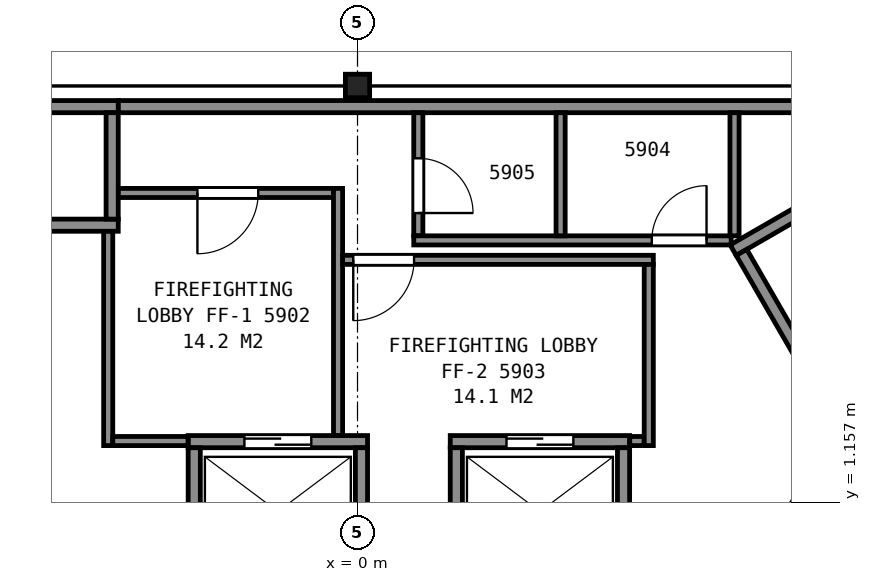
"""IFC4 building model, lengths in metres.
Left out: names, types, materials, properties, quantities, classifications, styles, units other than length and angle.
Written with IfcOpenShell. Run it as: python <this file> out.ifc"""

import sys

from ifc_helpers import new_model, si_unit, direction, frame, frame_2d, origin, origin_2d, place, context, subcontext, project, spatial, rectangle, i_section, extrude, element, fill, save


model = new_model("IFC4")
c1 = context("Model", 3, precision=1e-05, world=origin(), true_north=direction((0.0, 1.0)))
c2 = subcontext(c1, "Body", "Model", "MODEL_VIEW")
j1 = project(units=[si_unit("LENGTHUNIT", "METRE"), si_unit("PLANEANGLEUNIT", "RADIAN")], contexts=[c1])
p1 = place(None, origin())
s1 = spatial("IfcSite", under=j1, at=p1, CompositionType="ELEMENT")
p2 = place(p1, origin())
s2 = spatial("IfcBuilding", under=s1, at=p2, CompositionType="ELEMENT")
p3 = place(p2, frame((0.0, 0.0, 236.0)))
s3 = spatial("IfcBuildingStorey", under=s2, at=p3, CompositionType="ELEMENT", Elevation=236.0)
p4 = place(p3, frame((0.0, 8.0, 0.0), z_axis=(0.0, 0.0, 1.0), x_axis=(1.0, 0.0, 0.0)))
e1 = element("IfcColumn", 1, at=p4, inside=s3, PredefinedType="COLUMN", context=c2, shape_type="SweptSolid", body=[
    extrude(i_section(OverallWidth=0.399, OverallDepth=0.386, WebThickness=0.021, FlangeThickness=0.033, FilletRadius=0.015, at=origin_2d()), origin(), (0.0, 0.0, 1.0), 3.7),
])
p5 = place(p3, frame((6.178, 5.299, 0.0), z_axis=(0.0, 0.0, 1.0), x_axis=(0.866019993635, 0.500009370536, 0.0)))
e2 = element("IfcWall", 2, at=p5, inside=s3, PredefinedType="PARTITIONING", context=c2, shape_type="SweptSolid", body=[
    extrude(rectangle(XDim=9.6, YDim=0.2, at=frame_2d((4.8, 0.0))), origin(), (0.0, 0.0, 1.0), 3.45),
])
p6 = place(p3, frame((7.715, 2.838, 0.0), z_axis=(0.0, 0.0, 1.0), x_axis=(-0.500049511043, 0.865996816683, 0.0)))
e3 = element("IfcWall", 3, at=p6, inside=s3, PredefinedType="PARTITIONING", context=c2, shape_type="SweptSolid", body=[
    extrude(rectangle(XDim=2.8, YDim=0.2, at=frame_2d((1.4, 0.0))), origin(), (0.0, 0.0, 1.0), 3.45),
])
p7 = place(p3, frame((-2.785, 2.15, 0.0), z_axis=(0.0, 0.0, 1.0), x_axis=(1.0, 0.0, 0.0)))
e4 = element("IfcWall", 4, at=p7, inside=s3, PredefinedType="PARTITIONING", context=c2, shape_type="SweptSolid", body=[
    extrude(rectangle(XDim=2.95, YDim=0.2, at=frame_2d((1.475, 0.0))), origin(), (0.0, 0.0, 1.0), 3.7),
])
p8 = place(p7, frame((0.925, 0.0, 0.0)))
e5 = element("IfcOpeningElement", 5, at=p8, cuts=e4, PredefinedType="OPENING", context=c2, shape_type="SweptSolid", body=[
    extrude(rectangle(XDim=1.1, YDim=2.1, at=frame_2d((0.55, 1.05))), frame((0.0, 0.11, 0.0), z_axis=(0.0, -1.0, 0.0), x_axis=(1.0, 0.0, 0.0)), (0.0, 0.0, 1.0), 0.22),
])
p9 = place(p3, frame((1.525, 2.15, 0.0), z_axis=(0.0, 0.0, 1.0), x_axis=(1.0, 0.0, 0.0)))
e6 = element("IfcWall", 6, at=p9, inside=s3, PredefinedType="PARTITIONING", context=c2, shape_type="SweptSolid", body=[
    extrude(rectangle(XDim=2.95, YDim=0.2, at=frame_2d((1.475, 0.0))), origin(), (0.0, 0.0, 1.0), 3.7),
])
p10 = place(p9, frame((0.925, 0.0, 0.0)))
e7 = element("IfcOpeningElement", 7, at=p10, cuts=e6, PredefinedType="OPENING", context=c2, shape_type="SweptSolid", body=[
    extrude(rectangle(XDim=1.1, YDim=2.1, at=frame_2d((0.55, 1.05))), frame((0.0, 0.11, 0.0), z_axis=(0.0, -1.0, 0.0), x_axis=(1.0, 0.0, 0.0)), (0.0, 0.0, 1.0), 0.22),
])
for number, where, z_axis, x_axis in (
    (8, (-6.285, 5.71, 0.0), (0.0, 0.0, 1.0), (1.0, 0.0, 0.0)),
    (9, (-6.285, 7.66, 0.0), (0.0, 0.0, 1.0), (1.0, 0.0, 0.0)),
):
    element("IfcWall", number, at=place(p3, frame(where, z_axis=z_axis, x_axis=x_axis)), inside=s3, PredefinedType="PARTITIONING", context=c2, shape_type="SweptSolid", body=[
        extrude(rectangle(XDim=2.35, YDim=0.2, at=frame_2d((1.175, 0.0))), origin(), (0.0, 0.0, 1.0), 3.7),
    ])
p11 = place(p3, frame((5.663, -1.612, 0.0), z_axis=(0.0, 0.0, 1.0), x_axis=(0.49998122708, 0.866036242063, 0.0)))
e10 = element("IfcWall", 10, at=p11, inside=s3, PredefinedType="PARTITIONING", context=c2, shape_type="SweptSolid", body=[
    extrude(rectangle(XDim=4.9, YDim=0.2, at=frame_2d((2.45, 0.0))), origin(), (0.0, 0.0, 1.0), 3.7),
])
for number, where, z_axis, x_axis in (
    (11, (4.375, 0.1, 0.0), (0.0, 0.0, 1.0), (0.0, 1.0, 0.0)),
    (12, (1.625, 0.1, 0.0), (0.0, 0.0, 1.0), (0.0, 1.0, 0.0)),
    (13, (0.065, 0.1, 0.0), (0.0, 0.0, 1.0), (0.0, 1.0, 0.0)),
    (14, (-2.685, 0.1, 0.0), (0.0, 0.0, 1.0), (0.0, 1.0, 0.0)),
):
    element("IfcWall", number, at=place(p3, frame(where, z_axis=z_axis, x_axis=x_axis)), inside=s3, PredefinedType="PARTITIONING", context=c2, shape_type="SweptSolid", body=[
        extrude(rectangle(XDim=1.95, YDim=0.2, at=frame_2d((0.975, 0.0))), origin(), (0.0, 0.0, 1.0), 3.7),
    ])
p12 = place(p3, frame((-4.035, 5.81, 0.0), z_axis=(0.0, 0.0, 1.0), x_axis=(0.0, 1.0, 0.0)))
e15 = element("IfcWall", 15, at=p12, inside=s3, PredefinedType="PARTITIONING", context=c2, shape_type="SweptSolid", body=[
    extrude(rectangle(XDim=1.75, YDim=0.2, at=frame_2d((0.875, 0.0))), origin(), (0.0, 0.0, 1.0), 3.7),
])
p13 = place(p3, frame((-4.1, 2.085, 0.0), z_axis=(0.0, 0.0, 1.0), x_axis=(0.0, 1.0, 0.0)))
e16 = element("IfcWall", 16, at=p13, inside=s3, PredefinedType="PARTITIONING", context=c2, shape_type="SweptSolid", body=[
    extrude(rectangle(XDim=3.523, YDim=0.15, at=frame_2d((1.761, 0.0))), origin(), (0.0, 0.0, 1.0), 3.45),
])
p14 = place(p3, frame((-4.025, 2.16, 0.0), z_axis=(0.0, 0.0, 1.0), x_axis=(1.0, 0.0, 0.0)))
e17 = element("IfcWall", 17, at=p14, inside=s3, PredefinedType="PARTITIONING", context=c2, shape_type="SweptSolid", body=[
    extrude(rectangle(XDim=1.238, YDim=0.15, at=frame_2d((0.619, 0.0))), origin(), (0.0, 0.0, 1.0), 3.45),
])
p15 = place(p3, frame((-3.933, 6.24, 0.0), z_axis=(0.0, 0.0, 1.0), x_axis=(1.0, 0.0, 0.0)))
e18 = element("IfcWall", 18, at=p15, inside=s3, PredefinedType="PARTITIONING", context=c2, shape_type="SweptSolid", body=[
    extrude(rectangle(XDim=3.538, YDim=0.15, at=frame_2d((1.769, 0.0))), origin(), (0.0, 0.0, 1.0), 3.45),
])
p16 = place(p15, frame((1.3, 0.0, 0.0)))
e19 = element("IfcOpeningElement", 19, at=p16, cuts=e18, PredefinedType="OPENING", context=c2, shape_type="SweptSolid", body=[
    extrude(rectangle(XDim=1.0, YDim=2.1, at=frame_2d((0.5, 1.05))), frame((0.0, 0.085, 0.0), z_axis=(0.0, -1.0, 0.0), x_axis=(1.0, 0.0, 0.0)), (0.0, 0.0, 1.0), 0.17),
])
p17 = place(p3, frame((-3.933, 7.66, 0.0), z_axis=(0.0, 0.0, 1.0), x_axis=(1.0, 0.0, 0.0)))
e20 = element("IfcWall", 20, at=p17, inside=s3, PredefinedType="PARTITIONING", context=c2, shape_type="SweptSolid", body=[
    extrude(rectangle(XDim=13.841, YDim=0.2, at=frame_2d((6.92, 0.0))), origin(), (0.0, 0.0, 1.0), 3.45),
])
p18 = place(p3, frame((-0.32, 2.252, 0.0), z_axis=(0.0, 0.0, 1.0), x_axis=(0.0, 1.0, 0.0)))
e21 = element("IfcWall", 21, at=p18, inside=s3, PredefinedType="PARTITIONING", context=c2, shape_type="SweptSolid", body=[
    extrude(rectangle(XDim=4.063, YDim=0.15, at=frame_2d((2.031, 0.0))), origin(), (0.0, 0.0, 1.0), 3.45),
])
p19 = place(p3, frame((-0.245, 5.14, 0.0), z_axis=(0.0, 0.0, 1.0), x_axis=(1.0, 0.0, 0.0)))
e22 = element("IfcWall", 22, at=p19, inside=s3, PredefinedType="PARTITIONING", context=c2, shape_type="SweptSolid", body=[
    extrude(rectangle(XDim=5.11, YDim=0.15, at=frame_2d((2.555, 0.0))), origin(), (0.0, 0.0, 1.0), 3.45),
])
p20 = place(p19, frame((0.175, 0.0, 0.0)))
e23 = element("IfcOpeningElement", 23, at=p20, cuts=e22, PredefinedType="OPENING", context=c2, shape_type="SweptSolid", body=[
    extrude(rectangle(XDim=1.0, YDim=2.1, at=frame_2d((0.5, 1.05))), frame((0.0, 0.085, 0.0), z_axis=(0.0, -1.0, 0.0), x_axis=(1.0, 0.0, 0.0)), (0.0, 0.0, 1.0), 0.17),
])
p21 = place(p3, frame((1.0, 7.56, 0.0), z_axis=(0.0, 0.0, 1.0), x_axis=(0.0, -1.0, 0.0)))
e24 = element("IfcWall", 24, at=p21, inside=s3, PredefinedType="PARTITIONING", context=c2, shape_type="SweptSolid", body=[
    extrude(rectangle(XDim=2.025, YDim=0.15, at=frame_2d((1.013, 0.0))), origin(), (0.0, 0.0, 1.0), 3.45),
])
p22 = place(p21, frame((0.75, 0.0, 0.0)))
e25 = element("IfcOpeningElement", 25, at=p22, cuts=e24, PredefinedType="OPENING", context=c2, shape_type="SweptSolid", body=[
    extrude(rectangle(XDim=0.9, YDim=2.1, at=frame_2d((0.45, 1.05))), frame((0.0, 0.085, 0.0), z_axis=(0.0, -1.0, 0.0), x_axis=(1.0, 0.0, 0.0)), (0.0, 0.0, 1.0), 0.17),
])
p23 = place(p3, frame((0.925, 5.46, 0.0), z_axis=(0.0, 0.0, 1.0), x_axis=(1.0, 0.0, 0.0)))
e26 = element("IfcWall", 26, at=p23, inside=s3, PredefinedType="PARTITIONING", context=c2, shape_type="SweptSolid", body=[
    extrude(rectangle(XDim=5.22, YDim=0.15, at=frame_2d((2.61, 0.0))), origin(), (0.0, 0.0, 1.0), 3.45),
])
p24 = place(p23, frame((3.915, 0.0, 0.0)))
e27 = element("IfcOpeningElement", 27, at=p24, cuts=e26, PredefinedType="OPENING", context=c2, shape_type="SweptSolid", body=[
    extrude(rectangle(XDim=0.9, YDim=2.1, at=frame_2d((0.45, 1.05))), frame((0.0, 0.085, 0.0), z_axis=(0.0, -1.0, 0.0), x_axis=(1.0, 0.0, 0.0)), (0.0, 0.0, 1.0), 0.17),
])
p25 = place(p3, frame((3.34, 5.535, 0.0), z_axis=(0.0, 0.0, 1.0), x_axis=(0.0, 1.0, 0.0)))
e28 = element("IfcWall", 28, at=p25, inside=s3, PredefinedType="PARTITIONING", context=c2, shape_type="SweptSolid", body=[
    extrude(rectangle(XDim=2.025, YDim=0.15, at=frame_2d((1.013, 0.0))), origin(), (0.0, 0.0, 1.0), 3.45),
])
p26 = place(p3, frame((4.477, 2.16, 0.0), z_axis=(0.0, 0.0, 1.0), x_axis=(1.0, 0.0, 0.0)))
e29 = element("IfcWall", 29, at=p26, inside=s3, PredefinedType="PARTITIONING", context=c2, shape_type="SweptSolid", body=[
    extrude(rectangle(XDim=0.238, YDim=0.15, at=frame_2d((0.119, 0.0))), origin(), (0.0, 0.0, 1.0), 3.45),
])
p27 = place(p3, frame((4.79, 2.085, 0.0), z_axis=(0.0, 0.0, 1.0), x_axis=(0.0, 1.0, 0.0)))
e30 = element("IfcWall", 30, at=p27, inside=s3, PredefinedType="PARTITIONING", context=c2, shape_type="SweptSolid", body=[
    extrude(rectangle(XDim=2.98, YDim=0.15, at=frame_2d((1.49, 0.0))), origin(), (0.0, 0.0, 1.0), 3.45),
])
p28 = place(p3, frame((6.2, 5.535, 0.0), z_axis=(0.0, 0.0, 1.0), x_axis=(0.0, 1.0, 0.0)))
e31 = element("IfcWall", 31, at=p28, inside=s3, PredefinedType="PARTITIONING", context=c2, shape_type="SweptSolid", body=[
    extrude(rectangle(XDim=2.025, YDim=0.15, at=frame_2d((1.013, 0.0))), origin(), (0.0, 0.0, 1.0), 3.45),
])
p29 = place(p3, frame((-4.077, -12.543, 0.0), z_axis=(0.0, 0.0, 1.0), x_axis=(-0.499968768298, 0.866043434665, 0.0)))
e32 = element("IfcWall", 32, at=p29, inside=s3, PredefinedType="PARTITIONING", context=c2, shape_type="SweptSolid", body=[
    extrude(rectangle(XDim=17.703, YDim=0.2, at=frame_2d((8.852, 0.0))), origin(), (0.0, 0.0, 1.0), 2.713),
])
p30 = place(p29, frame((11.052, 0.0, 0.0)))
e33 = element("IfcOpeningElement", 33, at=p30, cuts=e32, PredefinedType="OPENING", context=c2, shape_type="SweptSolid", body=[
    extrude(rectangle(XDim=0.9, YDim=2.1, at=frame_2d((0.45, 1.05))), frame((0.0, 0.11, 0.0), z_axis=(0.0, -1.0, 0.0), x_axis=(1.0, 0.0, 0.0)), (0.0, 0.0, 1.0), 0.22),
])
p31 = place(p29, frame((7.098, 0.0, 0.0)))
e34 = element("IfcOpeningElement", 34, at=p31, cuts=e32, PredefinedType="OPENING", context=c2, shape_type="SweptSolid", body=[
    extrude(rectangle(XDim=0.9, YDim=2.1, at=frame_2d((0.45, 1.05))), frame((0.0, 0.11, 0.0), z_axis=(0.0, -1.0, 0.0), x_axis=(1.0, 0.0, 0.0)), (0.0, 0.0, 1.0), 0.22),
])
p32 = place(p29, frame((2.099, 0.0, 0.0)))
e35 = element("IfcOpeningElement", 35, at=p32, cuts=e32, PredefinedType="OPENING", context=c2, shape_type="SweptSolid", body=[
    extrude(rectangle(XDim=0.9, YDim=2.1, at=frame_2d((0.45, 1.05))), frame((0.0, 0.11, 0.0), z_axis=(0.0, -1.0, 0.0), x_axis=(1.0, 0.0, 0.0)), (0.0, 0.0, 1.0), 0.22),
])
p33 = place(p3, frame((12.903, 2.745, 0.0), z_axis=(0.0, 0.0, 1.0), x_axis=(-0.499997769292, -0.86602669168, 0.0)))
e36 = element("IfcWall", 36, at=p33, inside=s3, PredefinedType="PARTITIONING", context=c2, shape_type="SweptSolid", body=[
    extrude(rectangle(XDim=17.706, YDim=0.2, at=frame_2d((8.853, 0.0))), origin(), (0.0, 0.0, 1.0), 2.713),
])
p34 = place(p33, frame((14.637, 0.0, 0.0)))
e37 = element("IfcOpeningElement", 37, at=p34, cuts=e36, PredefinedType="OPENING", context=c2, shape_type="SweptSolid", body=[
    extrude(rectangle(XDim=0.9, YDim=2.1, at=frame_2d((0.45, 1.05))), frame((0.0, 0.11, 0.0), z_axis=(0.0, -1.0, 0.0), x_axis=(1.0, 0.0, 0.0)), (0.0, 0.0, 1.0), 0.22),
])
p35 = place(p33, frame((11.858, 0.0, 0.0)))
e38 = element("IfcOpeningElement", 38, at=p35, cuts=e36, PredefinedType="OPENING", context=c2, shape_type="SweptSolid", body=[
    extrude(rectangle(XDim=0.9, YDim=2.1, at=frame_2d((0.45, 1.05))), frame((0.0, 0.11, 0.0), z_axis=(0.0, -1.0, 0.0), x_axis=(1.0, 0.0, 0.0)), (0.0, 0.0, 1.0), 0.22),
])
p36 = place(p33, frame((5.303, 0.0, 0.0)))
e39 = element("IfcOpeningElement", 39, at=p36, cuts=e36, PredefinedType="OPENING", context=c2, shape_type="SweptSolid", body=[
    extrude(rectangle(XDim=0.9, YDim=2.1, at=frame_2d((0.45, 1.05))), frame((0.0, 0.11, 0.0), z_axis=(0.0, -1.0, 0.0), x_axis=(1.0, 0.0, 0.0)), (0.0, 0.0, 1.0), 0.22),
])
p37 = place(p33, frame((1.204, 0.0, 0.0)))
e40 = element("IfcOpeningElement", 40, at=p37, cuts=e36, PredefinedType="OPENING", context=c2, shape_type="SweptSolid", body=[
    extrude(rectangle(XDim=0.9, YDim=2.1, at=frame_2d((0.45, 1.05))), frame((0.0, 0.11, 0.0), z_axis=(0.0, -1.0, 0.0), x_axis=(1.0, 0.0, 0.0)), (0.0, 0.0, 1.0), 0.22),
])
p38 = place(p8, origin())
e41 = element("IfcDoor", 41, at=p38, inside=s3, OperationType="SLIDING_TO_LEFT", PredefinedType="DOOR", context=c2, shape_type="SweptSolid", body=[
    extrude(rectangle(XDim=1.1, YDim=2.1, at=frame_2d((0.55, 1.05))), frame((0.0, 0.025, 0.0), z_axis=(0.0, -1.0, 0.0), x_axis=(1.0, 0.0, 0.0)), (0.0, 0.0, 1.0), 0.05),
])
fill(e5, e41)
p39 = place(p10, origin())
e42 = element("IfcDoor", 42, at=p39, inside=s3, OperationType="SLIDING_TO_RIGHT", PredefinedType="DOOR", context=c2, shape_type="SweptSolid", body=[
    extrude(rectangle(XDim=1.1, YDim=2.1, at=frame_2d((0.55, 1.05))), frame((0.0, 0.025, 0.0), z_axis=(0.0, -1.0, 0.0), x_axis=(1.0, 0.0, 0.0)), (0.0, 0.0, 1.0), 0.05),
])
fill(e7, e42)
p40 = place(p16, origin())
e43 = element("IfcDoor", 43, at=p40, inside=s3, OperationType="SINGLE_SWING_LEFT", PredefinedType="DOOR", context=c2, shape_type="SweptSolid", body=[
    extrude(rectangle(XDim=1.0, YDim=2.1, at=frame_2d((0.5, 1.05))), frame((0.0, 0.025, 0.0), z_axis=(0.0, -1.0, 0.0), x_axis=(1.0, 0.0, 0.0)), (0.0, 0.0, 1.0), 0.05),
])
fill(e19, e43)
p41 = place(p20, origin())
e44 = element("IfcDoor", 44, at=p41, inside=s3, OperationType="SINGLE_SWING_LEFT", PredefinedType="DOOR", context=c2, shape_type="SweptSolid", body=[
    extrude(rectangle(XDim=1.0, YDim=2.1, at=frame_2d((0.5, 1.05))), frame((0.0, 0.025, 0.0), z_axis=(0.0, -1.0, 0.0), x_axis=(1.0, 0.0, 0.0)), (0.0, 0.0, 1.0), 0.05),
])
fill(e23, e44)
p42 = place(p22, origin())
e45 = element("IfcDoor", 45, at=p42, inside=s3, OperationType="SINGLE_SWING_RIGHT", PredefinedType="DOOR", context=c2, shape_type="SweptSolid", body=[
    extrude(rectangle(XDim=0.9, YDim=2.1, at=frame_2d((0.45, 1.05))), frame((0.0, 0.025, 0.0), z_axis=(0.0, -1.0, 0.0), x_axis=(1.0, 0.0, 0.0)), (0.0, 0.0, 1.0), 0.05),
])
fill(e25, e45)
p43 = place(p24, origin())
e46 = element("IfcDoor", 46, at=p43, inside=s3, OperationType="SINGLE_SWING_RIGHT", PredefinedType="DOOR", context=c2, shape_type="SweptSolid", body=[
    extrude(rectangle(XDim=0.9, YDim=2.1, at=frame_2d((0.45, 1.05))), frame((0.0, 0.025, 0.0), z_axis=(0.0, -1.0, 0.0), x_axis=(1.0, 0.0, 0.0)), (0.0, 0.0, 1.0), 0.05),
])
fill(e27, e46)
save(model, sys.argv[1])
